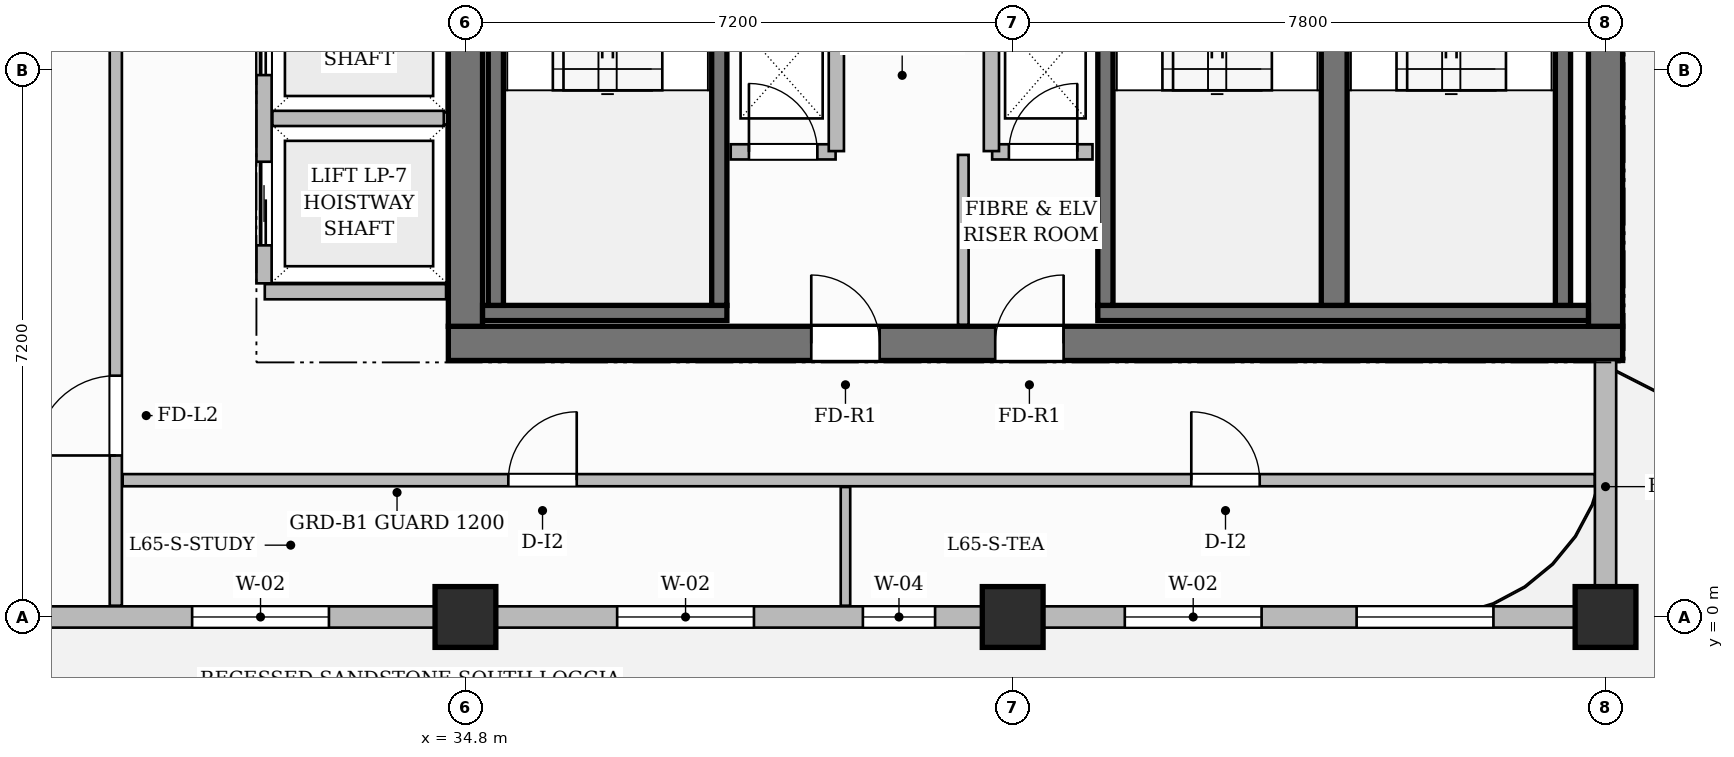
"""IFC4 building model, lengths in metres.
Left out: names, types, materials, properties, quantities, classifications, styles, units other than length and angle.
Written with IfcOpenShell. Run it as: python <this file> out.ifc"""

import sys

from ifc_helpers import new_model, si_unit, direction, frame, frame_2d, origin, origin_2d, place, context, subcontext, project, spatial, rectangle, extrude, source, transform, mapped, element, fill, save


model = new_model("IFC4")
c1 = context("Model", 3, precision=1e-05, world=origin(), true_north=direction((0.0, 1.0)))
c2 = subcontext(c1, "Body", "Model", "MODEL_VIEW")
j1 = project(units=[si_unit("LENGTHUNIT", "METRE"), si_unit("PLANEANGLEUNIT", "RADIAN")], contexts=[c1])
p1 = place(None, origin())
s1 = spatial("IfcSite", under=j1, at=p1, CompositionType="ELEMENT")
p2 = place(p1, origin())
s2 = spatial("IfcBuilding", under=s1, at=p2, CompositionType="ELEMENT")
p3 = place(p2, frame((0.0, 0.0, 259.65)))
s3 = spatial("IfcBuildingStorey", under=s2, at=p3, CompositionType="ELEMENT", Elevation=259.65)
p4 = place(p3, frame((34.575, 3.6, 0.0), z_axis=(0.0, 0.0, 1.0), x_axis=(1.0, 0.0, 0.0)))
e1 = element("IfcWall", 1, at=p4, inside=s3, PredefinedType="SHEAR", context=c2, shape_type="SweptSolid", body=[
    extrude(rectangle(XDim=15.45, YDim=0.45, at=frame_2d((7.725, 0.0))), origin(), (0.0, 0.0, 1.0), 3.85),
])
p5 = place(p4, frame((4.775, 0.0, 0.0)))
e2 = element("IfcOpeningElement", 2, at=p5, cuts=e1, PredefinedType="OPENING", context=c2, shape_type="SweptSolid", body=[
    extrude(rectangle(XDim=0.9, YDim=2.1, at=frame_2d((0.45, 1.05))), frame((0.0, 0.235, 0.0), z_axis=(0.0, -1.0, 0.0), x_axis=(1.0, 0.0, 0.0)), (0.0, 0.0, 1.0), 0.47),
])
p6 = place(p4, frame((7.195, 0.0, 0.0)))
e3 = element("IfcOpeningElement", 3, at=p6, cuts=e1, PredefinedType="OPENING", context=c2, shape_type="SweptSolid", body=[
    extrude(rectangle(XDim=0.9, YDim=2.1, at=frame_2d((0.45, 1.05))), frame((0.0, 0.235, 0.0), z_axis=(0.0, -1.0, 0.0), x_axis=(1.0, 0.0, 0.0)), (0.0, 0.0, 1.0), 0.47),
])
for number, where, z_axis, x_axis in (
    (4, (34.8, 3.825, 0.0), (0.0, 0.0, 1.0), (0.0, 1.0, 0.0)),
    (5, (49.8, 3.825, 0.0), (0.0, 0.0, 1.0), (0.0, 1.0, 0.0)),
):
    element("IfcWall", number, at=place(p3, frame(where, z_axis=z_axis, x_axis=x_axis)), inside=s3, PredefinedType="SHEAR", context=c2, shape_type="SweptSolid", body=[
        extrude(rectangle(XDim=10.35, YDim=0.45, at=frame_2d((5.175, 0.0))), origin(), (0.0, 0.0, 1.0), 3.85),
    ])
m1 = source(origin(), c2, "Body", "SweptSolid", [
    extrude(rectangle(XDim=0.8, YDim=0.8, at=origin_2d()), origin(), (0.0, 0.0, 1.0), 3.85),
])
for number, where, z_axis, x_axis in (
    (6, (34.8, 0.0, 0.0), (0.0, 0.0, 1.0), (1.0, 0.0, 0.0)),
    (7, (42.0, 0.0, 0.0), (0.0, 0.0, 1.0), (1.0, 0.0, 0.0)),
    (8, (49.8, 0.0, 0.0), (0.0, 0.0, 1.0), (1.0, 0.0, 0.0)),
):
    element("IfcColumn", number, at=place(p3, frame(where, z_axis=z_axis, x_axis=x_axis)), inside=s3, PredefinedType="COLUMN", context=c2, shape_type="MappedRepresentation", body=[
        mapped(m1, transform((0.0, 0.0, 0.0), scale=1.0)),
    ])
p7 = place(p3, frame((35.025, 4.0, 0.0), z_axis=(0.0, 0.0, 1.0), x_axis=(1.0, 0.0, 0.0)))
e9 = element("IfcWall", 9, at=p7, inside=s3, PredefinedType="SHEAR", context=c2, shape_type="SweptSolid", body=[
    extrude(rectangle(XDim=3.215, YDim=0.2, at=frame_2d((1.607, 0.0))), origin(), (0.0, 0.0, 1.0), 3.85),
])
for number, where, z_axis, x_axis in (
    (10, (35.2, 4.1, 0.0), (0.0, 0.0, 1.0), (0.0, 1.0, 0.0)),
    (11, (38.14, 4.1, 0.0), (0.0, 0.0, 1.0), (0.0, 1.0, 0.0)),
):
    element("IfcWall", number, at=place(p3, frame(where, z_axis=z_axis, x_axis=x_axis)), inside=s3, PredefinedType="SHEAR", context=c2, shape_type="SweptSolid", body=[
        extrude(rectangle(XDim=6.95, YDim=0.2, at=frame_2d((3.475, 0.0))), origin(), (0.0, 0.0, 1.0), 3.85),
    ])
p8 = place(p3, frame((43.12, 4.0, 0.0), z_axis=(0.0, 0.0, 1.0), x_axis=(1.0, 0.0, 0.0)))
e12 = element("IfcWall", 12, at=p8, inside=s3, PredefinedType="SHEAR", context=c2, shape_type="SweptSolid", body=[
    extrude(rectangle(XDim=6.455, YDim=0.2, at=frame_2d((3.228, 0.0))), origin(), (0.0, 0.0, 1.0), 3.85),
])
p9 = place(p3, frame((43.22, 4.1, 0.0), z_axis=(0.0, 0.0, 1.0), x_axis=(0.0, 1.0, 0.0)))
e13 = element("IfcWall", 13, at=p9, inside=s3, PredefinedType="SHEAR", context=c2, shape_type="SweptSolid", body=[
    extrude(rectangle(XDim=6.95, YDim=0.2, at=frame_2d((3.475, 0.0))), origin(), (0.0, 0.0, 1.0), 3.85),
])
p10 = place(p3, frame((46.23, 4.1, 0.0), z_axis=(0.0, 0.0, 1.0), x_axis=(0.0, 1.0, 0.0)))
e14 = element("IfcWall", 14, at=p10, inside=s3, PredefinedType="SHEAR", context=c2, shape_type="SweptSolid", body=[
    extrude(rectangle(XDim=6.95, YDim=0.34, at=frame_2d((3.475, 0.0))), origin(), (0.0, 0.0, 1.0), 3.85),
])
p11 = place(p3, frame((49.24, 4.1, 0.0), z_axis=(0.0, 0.0, 1.0), x_axis=(0.0, 1.0, 0.0)))
e15 = element("IfcWall", 15, at=p11, inside=s3, PredefinedType="SHEAR", context=c2, shape_type="SweptSolid", body=[
    extrude(rectangle(XDim=6.95, YDim=0.2, at=frame_2d((3.475, 0.0))), origin(), (0.0, 0.0, 1.0), 3.85),
])
p12 = place(p3, frame((38.29, 6.12, 0.0), z_axis=(0.0, 0.0, 1.0), x_axis=(1.0, 0.0, 0.0)))
e16 = element("IfcWall", 16, at=p12, inside=s3, PredefinedType="PARTITIONING", context=c2, shape_type="SweptSolid", body=[
    extrude(rectangle(XDim=1.38, YDim=0.2, at=frame_2d((0.69, 0.0))), origin(), (0.0, 0.0, 1.0), 3.6),
])
p13 = place(p12, frame((0.24, 0.0, 0.0)))
e17 = element("IfcOpeningElement", 17, at=p13, cuts=e16, PredefinedType="OPENING", context=c2, shape_type="SweptSolid", body=[
    extrude(rectangle(XDim=0.9, YDim=2.1, at=frame_2d((0.45, 1.05))), frame((0.0, 0.11, 0.0), z_axis=(0.0, -1.0, 0.0), x_axis=(1.0, 0.0, 0.0)), (0.0, 0.0, 1.0), 0.22),
])
p14 = place(p3, frame((39.68, 6.13, 0.0), z_axis=(0.0, 0.0, 1.0), x_axis=(0.0, 1.0, 0.0)))
e18 = element("IfcWall", 18, at=p14, inside=s3, PredefinedType="PARTITIONING", context=c2, shape_type="SweptSolid", body=[
    extrude(rectangle(XDim=1.79, YDim=0.2, at=frame_2d((0.895, 0.0))), origin(), (0.0, 0.0, 1.0), 3.6),
])
p15 = place(p3, frame((41.73, 6.12, 0.0), z_axis=(0.0, 0.0, 1.0), x_axis=(1.0, 0.0, 0.0)))
e19 = element("IfcWall", 19, at=p15, inside=s3, PredefinedType="PARTITIONING", context=c2, shape_type="SweptSolid", body=[
    extrude(rectangle(XDim=1.32, YDim=0.2, at=frame_2d((0.66, 0.0))), origin(), (0.0, 0.0, 1.0), 3.6),
])
p16 = place(p15, frame((0.22, 0.0, 0.0)))
e20 = element("IfcOpeningElement", 20, at=p16, cuts=e19, PredefinedType="OPENING", context=c2, shape_type="SweptSolid", body=[
    extrude(rectangle(XDim=0.9, YDim=2.1, at=frame_2d((0.45, 1.05))), frame((0.0, 0.11, 0.0), z_axis=(0.0, -1.0, 0.0), x_axis=(1.0, 0.0, 0.0)), (0.0, 0.0, 1.0), 0.22),
])
p17 = place(p3, frame((41.72, 6.13, 0.0), z_axis=(0.0, 0.0, 1.0), x_axis=(0.0, 1.0, 0.0)))
e21 = element("IfcWall", 21, at=p17, inside=s3, PredefinedType="PARTITIONING", context=c2, shape_type="SweptSolid", body=[
    extrude(rectangle(XDim=1.79, YDim=0.2, at=frame_2d((0.895, 0.0))), origin(), (0.0, 0.0, 1.0), 3.6),
])
p18 = place(p3, frame((41.35, 3.845, 0.0), z_axis=(0.0, 0.0, 1.0), x_axis=(0.0, 1.0, 0.0)))
e22 = element("IfcWall", 22, at=p18, inside=s3, PredefinedType="PARTITIONING", context=c2, shape_type="SweptSolid", body=[
    extrude(rectangle(XDim=2.235, YDim=0.14, at=frame_2d((1.118, 0.0))), origin(), (0.0, 0.0, 1.0), 3.6),
])
p19 = place(p3, frame((32.16, 4.28, 0.0), z_axis=(0.0, 0.0, 1.0), x_axis=(1.0, 0.0, 0.0)))
e23 = element("IfcWall", 23, at=p19, inside=s3, PredefinedType="PARTITIONING", context=c2, shape_type="SweptSolid", body=[
    extrude(rectangle(XDim=2.385, YDim=0.2, at=frame_2d((1.192, 0.0))), origin(), (0.0, 0.0, 1.0), 3.6),
])
p20 = place(p3, frame((32.15, 4.39, 0.0), z_axis=(0.0, 0.0, 1.0), x_axis=(0.0, 1.0, 0.0)))
e24 = element("IfcWall", 24, at=p20, inside=s3, PredefinedType="PARTITIONING", context=c2, shape_type="SweptSolid", body=[
    extrude(rectangle(XDim=8.82, YDim=0.2, at=frame_2d((4.41, 0.0))), origin(), (0.0, 0.0, 1.0), 3.6),
])
p21 = place(p20, frame((0.5, 0.0, 0.0)))
e25 = element("IfcOpeningElement", 25, at=p21, cuts=e24, PredefinedType="OPENING", context=c2, shape_type="SweptSolid", body=[
    extrude(rectangle(XDim=1.1, YDim=2.2, at=frame_2d((0.55, 1.1))), frame((0.0, 0.11, 0.0), z_axis=(0.0, -1.0, 0.0), x_axis=(1.0, 0.0, 0.0)), (0.0, 0.0, 1.0), 0.22),
])
p22 = place(p20, frame((2.74, 0.0, 0.0)))
e26 = element("IfcOpeningElement", 26, at=p22, cuts=e24, PredefinedType="OPENING", context=c2, shape_type="SweptSolid", body=[
    extrude(rectangle(XDim=1.1, YDim=2.2, at=frame_2d((0.55, 1.1))), frame((0.0, 0.11, 0.0), z_axis=(0.0, -1.0, 0.0), x_axis=(1.0, 0.0, 0.0)), (0.0, 0.0, 1.0), 0.22),
])
p23 = place(p20, frame((4.98, 0.0, 0.0)))
e27 = element("IfcOpeningElement", 27, at=p23, cuts=e24, PredefinedType="OPENING", context=c2, shape_type="SweptSolid", body=[
    extrude(rectangle(XDim=1.1, YDim=2.2, at=frame_2d((0.55, 1.1))), frame((0.0, 0.11, 0.0), z_axis=(0.0, -1.0, 0.0), x_axis=(1.0, 0.0, 0.0)), (0.0, 0.0, 1.0), 0.22),
])
p24 = place(p20, frame((7.22, 0.0, 0.0)))
e28 = element("IfcOpeningElement", 28, at=p24, cuts=e24, PredefinedType="OPENING", context=c2, shape_type="SweptSolid", body=[
    extrude(rectangle(XDim=1.1, YDim=2.2, at=frame_2d((0.55, 1.1))), frame((0.0, 0.11, 0.0), z_axis=(0.0, -1.0, 0.0), x_axis=(1.0, 0.0, 0.0)), (0.0, 0.0, 1.0), 0.22),
])
p25 = place(p3, frame((32.26, 6.56, 0.0), z_axis=(0.0, 0.0, 1.0), x_axis=(1.0, 0.0, 0.0)))
e29 = element("IfcWall", 29, at=p25, inside=s3, PredefinedType="PARTITIONING", context=c2, shape_type="SweptSolid", body=[
    extrude(rectangle(XDim=2.255, YDim=0.2, at=frame_2d((1.127, 0.0))), origin(), (0.0, 0.0, 1.0), 3.6),
])
p26 = place(p3, frame((30.2, 0.148, 0.0), z_axis=(0.0, 0.0, 1.0), x_axis=(0.0, 1.0, 0.0)))
e30 = element("IfcWall", 30, at=p26, inside=s3, PredefinedType="PARTITIONING", context=c2, shape_type="SweptSolid", body=[
    extrude(rectangle(XDim=9.912, YDim=0.16, at=frame_2d((4.956, 0.0))), origin(), (0.0, 0.0, 1.0), 3.6),
])
p27 = place(p26, frame((1.977, 0.0, 0.0)))
e31 = element("IfcOpeningElement", 31, at=p27, cuts=e30, PredefinedType="OPENING", context=c2, shape_type="SweptSolid", body=[
    extrude(rectangle(XDim=1.05, YDim=2.15, at=frame_2d((0.525, 1.075))), frame((0.0, 0.09, 0.0), z_axis=(0.0, -1.0, 0.0), x_axis=(1.0, 0.0, 0.0)), (0.0, 0.0, 1.0), 0.18),
])
p28 = place(p3, frame((30.29, 1.8, 0.0), z_axis=(0.0, 0.0, 1.0), x_axis=(1.0, 0.0, 0.0)))
e32 = element("IfcWall", 32, at=p28, inside=s3, PredefinedType="PARTITIONING", context=c2, shape_type="SweptSolid", body=[
    extrude(rectangle(XDim=19.37, YDim=0.16, at=frame_2d((9.685, 0.0))), origin(), (0.0, 0.0, 1.0), 3.6),
])
p29 = place(p28, frame((5.074, 0.0, 0.0)))
e33 = element("IfcOpeningElement", 33, at=p29, cuts=e32, PredefinedType="OPENING", context=c2, shape_type="SweptSolid", body=[
    extrude(rectangle(XDim=0.9, YDim=2.15, at=frame_2d((0.45, 1.075))), frame((0.0, 0.09, 0.0), z_axis=(0.0, -1.0, 0.0), x_axis=(1.0, 0.0, 0.0)), (0.0, 0.0, 1.0), 0.18),
])
p30 = place(p28, frame((14.06, 0.0, 0.0)))
e34 = element("IfcOpeningElement", 34, at=p30, cuts=e32, PredefinedType="OPENING", context=c2, shape_type="SweptSolid", body=[
    extrude(rectangle(XDim=0.9, YDim=2.15, at=frame_2d((0.45, 1.075))), frame((0.0, 0.09, 0.0), z_axis=(0.0, -1.0, 0.0), x_axis=(1.0, 0.0, 0.0)), (0.0, 0.0, 1.0), 0.18),
])
p31 = place(p3, frame((39.8, 0.148, 0.0), z_axis=(0.0, 0.0, 1.0), x_axis=(0.0, 1.0, 0.0)))
e35 = element("IfcWall", 35, at=p31, inside=s3, PredefinedType="PARTITIONING", context=c2, shape_type="SweptSolid", body=[
    extrude(rectangle(XDim=1.562, YDim=0.125, at=frame_2d((0.781, 0.0))), origin(), (0.0, 0.0, 1.0), 3.6),
])
p32 = place(p3, frame((18.0, 0.0, 0.0), z_axis=(0.0, 0.0, 1.0), x_axis=(1.0, 0.0, 0.0)))
e36 = element("IfcWall", 36, at=p32, inside=s3, PredefinedType="SOLIDWALL", context=c2, shape_type="SweptSolid", body=[
    extrude(rectangle(XDim=31.8, YDim=0.28, at=frame_2d((15.9, 0.0))), origin(), (0.0, 0.0, 1.0), 3.185),
])
p33 = place(p32, frame((0.42, 0.0, 0.0)))
e37 = element("IfcOpeningElement", 37, at=p33, cuts=e36, PredefinedType="OPENING", context=c2, shape_type="SweptSolid", body=[
    extrude(rectangle(XDim=1.2, YDim=2.2, at=frame_2d((0.6, 1.1))), frame((0.0, 0.15, 0.0), z_axis=(0.0, -1.0, 0.0), x_axis=(1.0, 0.0, 0.0)), (0.0, 0.0, 1.0), 0.3),
])
p34 = place(p32, frame((4.896, 0.0, 0.8)))
e38 = element("IfcOpeningElement", 38, at=p34, cuts=e36, PredefinedType="OPENING", context=c2, shape_type="SweptSolid", body=[
    extrude(rectangle(XDim=1.4, YDim=1.85, at=frame_2d((0.7, 0.925))), frame((0.0, 0.15, 0.0), z_axis=(0.0, -1.0, 0.0), x_axis=(1.0, 0.0, 0.0)), (0.0, 0.0, 1.0), 0.3),
])
p35 = place(p32, frame((7.504, 0.0, 0.8)))
e39 = element("IfcOpeningElement", 39, at=p35, cuts=e36, PredefinedType="OPENING", context=c2, shape_type="SweptSolid", body=[
    extrude(rectangle(XDim=1.8, YDim=1.85, at=frame_2d((0.9, 0.925))), frame((0.0, 0.15, 0.0), z_axis=(0.0, -1.0, 0.0), x_axis=(1.0, 0.0, 0.0)), (0.0, 0.0, 1.0), 0.3),
])
p36 = place(p32, frame((13.204, 0.0, 0.8)))
e40 = element("IfcOpeningElement", 40, at=p36, cuts=e36, PredefinedType="OPENING", context=c2, shape_type="SweptSolid", body=[
    extrude(rectangle(XDim=1.8, YDim=1.85, at=frame_2d((0.9, 0.925))), frame((0.0, 0.15, 0.0), z_axis=(0.0, -1.0, 0.0), x_axis=(1.0, 0.0, 0.0)), (0.0, 0.0, 1.0), 0.3),
])
p37 = place(p32, frame((18.796, 0.0, 0.8)))
e41 = element("IfcOpeningElement", 41, at=p37, cuts=e36, PredefinedType="OPENING", context=c2, shape_type="SweptSolid", body=[
    extrude(rectangle(XDim=1.8, YDim=1.85, at=frame_2d((0.9, 0.925))), frame((0.0, 0.15, 0.0), z_axis=(0.0, -1.0, 0.0), x_axis=(1.0, 0.0, 0.0)), (0.0, 0.0, 1.0), 0.3),
])
p38 = place(p32, frame((22.029, 0.0, 0.8)))
e42 = element("IfcOpeningElement", 42, at=p38, cuts=e36, PredefinedType="OPENING", context=c2, shape_type="SweptSolid", body=[
    extrude(rectangle(XDim=0.95, YDim=1.75, at=frame_2d((0.475, 0.875))), frame((0.0, 0.15, 0.0), z_axis=(0.0, -1.0, 0.0), x_axis=(1.0, 0.0, 0.0)), (0.0, 0.0, 1.0), 0.3),
])
p39 = place(p32, frame((25.475, 0.0, 0.8)))
e43 = element("IfcOpeningElement", 43, at=p39, cuts=e36, PredefinedType="OPENING", context=c2, shape_type="SweptSolid", body=[
    extrude(rectangle(XDim=1.8, YDim=1.85, at=frame_2d((0.9, 0.925))), frame((0.0, 0.15, 0.0), z_axis=(0.0, -1.0, 0.0), x_axis=(1.0, 0.0, 0.0)), (0.0, 0.0, 1.0), 0.3),
])
p40 = place(p32, frame((28.525, 0.0, 0.8)))
e44 = element("IfcOpeningElement", 44, at=p40, cuts=e36, PredefinedType="OPENING", context=c2, shape_type="SweptSolid", body=[
    extrude(rectangle(XDim=1.8, YDim=1.85, at=frame_2d((0.9, 0.925))), frame((0.0, 0.15, 0.0), z_axis=(0.0, -1.0, 0.0), x_axis=(1.0, 0.0, 0.0)), (0.0, 0.0, 1.0), 0.3),
])
p41 = place(p3, frame((49.8, 0.05, 0.0), z_axis=(0.0, 0.0, 1.0), x_axis=(0.0, 1.0, 0.0)))
e45 = element("IfcWall", 45, at=p41, inside=s3, PredefinedType="SOLIDWALL", context=c2, shape_type="SweptSolid", body=[
    extrude(rectangle(XDim=3.33, YDim=0.28, at=frame_2d((1.665, 0.0))), origin(), (0.0, 0.0, 1.0), 3.6),
])
m2 = source(origin(), c2, "Body", "SweptSolid", [
    extrude(rectangle(XDim=0.9, YDim=2.1, at=frame_2d((0.45, 1.05))), frame((0.0, 0.025, 0.0), z_axis=(0.0, -1.0, 0.0), x_axis=(1.0, 0.0, 0.0)), (0.0, 0.0, 1.0), 0.05),
])
p42 = place(p13, origin())
e46 = element("IfcDoor", 46, at=p42, inside=s3, OperationType="SINGLE_SWING_LEFT", PredefinedType="DOOR", context=c2, shape_type="MappedRepresentation", body=[
    mapped(m2, transform((0.0, 0.0, 0.0), scale=1.0)),
])
fill(e17, e46)
p43 = place(p16, origin())
e47 = element("IfcDoor", 47, at=p43, inside=s3, OperationType="SINGLE_SWING_RIGHT", PredefinedType="DOOR", context=c2, shape_type="MappedRepresentation", body=[
    mapped(m2, transform((0.0, 0.0, 0.0), scale=1.0)),
])
fill(e20, e47)
p44 = place(p5, origin())
e48 = element("IfcDoor", 48, at=p44, inside=s3, OperationType="SINGLE_SWING_LEFT", PredefinedType="DOOR", context=c2, shape_type="MappedRepresentation", body=[
    mapped(m2, transform((0.0, 0.0, 0.0), scale=1.0)),
])
fill(e2, e48)
p45 = place(p6, origin())
e49 = element("IfcDoor", 49, at=p45, inside=s3, OperationType="SINGLE_SWING_RIGHT", PredefinedType="DOOR", context=c2, shape_type="MappedRepresentation", body=[
    mapped(m2, transform((0.0, 0.0, 0.0), scale=1.0)),
])
fill(e3, e49)
m3 = source(origin(), c2, "Body", "SweptSolid", [
    extrude(rectangle(XDim=1.05, YDim=2.15, at=frame_2d((0.525, 1.075))), frame((0.0, 0.025, 0.0), z_axis=(0.0, -1.0, 0.0), x_axis=(1.0, 0.0, 0.0)), (0.0, 0.0, 1.0), 0.05),
])
p46 = place(p27, origin())
e50 = element("IfcDoor", 50, at=p46, inside=s3, OperationType="SINGLE_SWING_LEFT", PredefinedType="DOOR", context=c2, shape_type="MappedRepresentation", body=[
    mapped(m3, transform((0.0, 0.0, 0.0), scale=1.0)),
])
fill(e31, e50)
m4 = source(origin(), c2, "Body", "SweptSolid", [
    extrude(rectangle(XDim=0.9, YDim=2.15, at=frame_2d((0.45, 1.075))), frame((0.0, 0.025, 0.0), z_axis=(0.0, -1.0, 0.0), x_axis=(1.0, 0.0, 0.0)), (0.0, 0.0, 1.0), 0.05),
])
p47 = place(p29, origin())
e51 = element("IfcDoor", 51, at=p47, inside=s3, OperationType="SINGLE_SWING_RIGHT", PredefinedType="DOOR", context=c2, shape_type="MappedRepresentation", body=[
    mapped(m4, transform((0.0, 0.0, 0.0), scale=1.0)),
])
fill(e33, e51)
p48 = place(p30, origin())
e52 = element("IfcDoor", 52, at=p48, inside=s3, OperationType="SINGLE_SWING_LEFT", PredefinedType="DOOR", context=c2, shape_type="MappedRepresentation", body=[
    mapped(m4, transform((0.0, 0.0, 0.0), scale=1.0)),
])
fill(e34, e52)
m5 = source(origin(), c2, "Body", "SweptSolid", [
    extrude(rectangle(XDim=1.1, YDim=2.2, at=frame_2d((0.55, 1.1))), frame((0.0, 0.025, 0.0), z_axis=(0.0, -1.0, 0.0), x_axis=(1.0, 0.0, 0.0)), (0.0, 0.0, 1.0), 0.05),
])
p49 = place(p21, origin())
e53 = element("IfcDoor", 53, at=p49, inside=s3, OperationType="SLIDING_TO_LEFT", PredefinedType="DOOR", context=c2, shape_type="MappedRepresentation", body=[
    mapped(m5, transform((0.0, 0.0, 0.0), scale=1.0)),
])
fill(e25, e53)
p50 = place(p22, origin())
e54 = element("IfcDoor", 54, at=p50, inside=s3, OperationType="SLIDING_TO_LEFT", PredefinedType="DOOR", context=c2, shape_type="MappedRepresentation", body=[
    mapped(m5, transform((0.0, 0.0, 0.0), scale=1.0)),
])
fill(e26, e54)
m6 = source(origin(), c2, "Body", "SweptSolid", [
    extrude(rectangle(XDim=1.8, YDim=1.85, at=frame_2d((0.9, 0.925))), frame((0.0, 0.03, 0.0), z_axis=(0.0, -1.0, 0.0), x_axis=(1.0, 0.0, 0.0)), (0.0, 0.0, 1.0), 0.06),
])
p51 = place(p36, origin())
e55 = element("IfcWindow", 55, at=p51, inside=s3, PartitioningType="DOUBLE_PANEL_VERTICAL", PredefinedType="WINDOW", context=c2, shape_type="MappedRepresentation", body=[
    mapped(m6, transform((0.0, 0.0, 0.0), scale=1.0)),
])
fill(e40, e55)
p52 = place(p37, origin())
e56 = element("IfcWindow", 56, at=p52, inside=s3, PartitioningType="DOUBLE_PANEL_VERTICAL", PredefinedType="WINDOW", context=c2, shape_type="MappedRepresentation", body=[
    mapped(m6, transform((0.0, 0.0, 0.0), scale=1.0)),
])
fill(e41, e56)
m7 = source(origin(), c2, "Body", "SweptSolid", [
    extrude(rectangle(XDim=0.95, YDim=1.75, at=frame_2d((0.475, 0.875))), frame((0.0, 0.03, 0.0), z_axis=(0.0, -1.0, 0.0), x_axis=(1.0, 0.0, 0.0)), (0.0, 0.0, 1.0), 0.06),
])
p53 = place(p38, origin())
e57 = element("IfcWindow", 57, at=p53, inside=s3, PartitioningType="SINGLE_PANEL", PredefinedType="WINDOW", context=c2, shape_type="MappedRepresentation", body=[
    mapped(m7, transform((0.0, 0.0, 0.0), scale=1.0)),
])
fill(e42, e57)
p54 = place(p39, origin())
e58 = element("IfcWindow", 58, at=p54, inside=s3, PartitioningType="DOUBLE_PANEL_VERTICAL", PredefinedType="WINDOW", context=c2, shape_type="MappedRepresentation", body=[
    mapped(m6, transform((0.0, 0.0, 0.0), scale=1.0)),
])
fill(e43, e58)
p55 = place(p40, origin())
e59 = element("IfcWindow", 59, at=p55, inside=s3, PartitioningType="DOUBLE_PANEL_VERTICAL", PredefinedType="WINDOW", context=c2, shape_type="MappedRepresentation", body=[
    mapped(m6, transform((0.0, 0.0, 0.0), scale=1.0)),
])
fill(e44, e59)
save(model, sys.argv[1])
